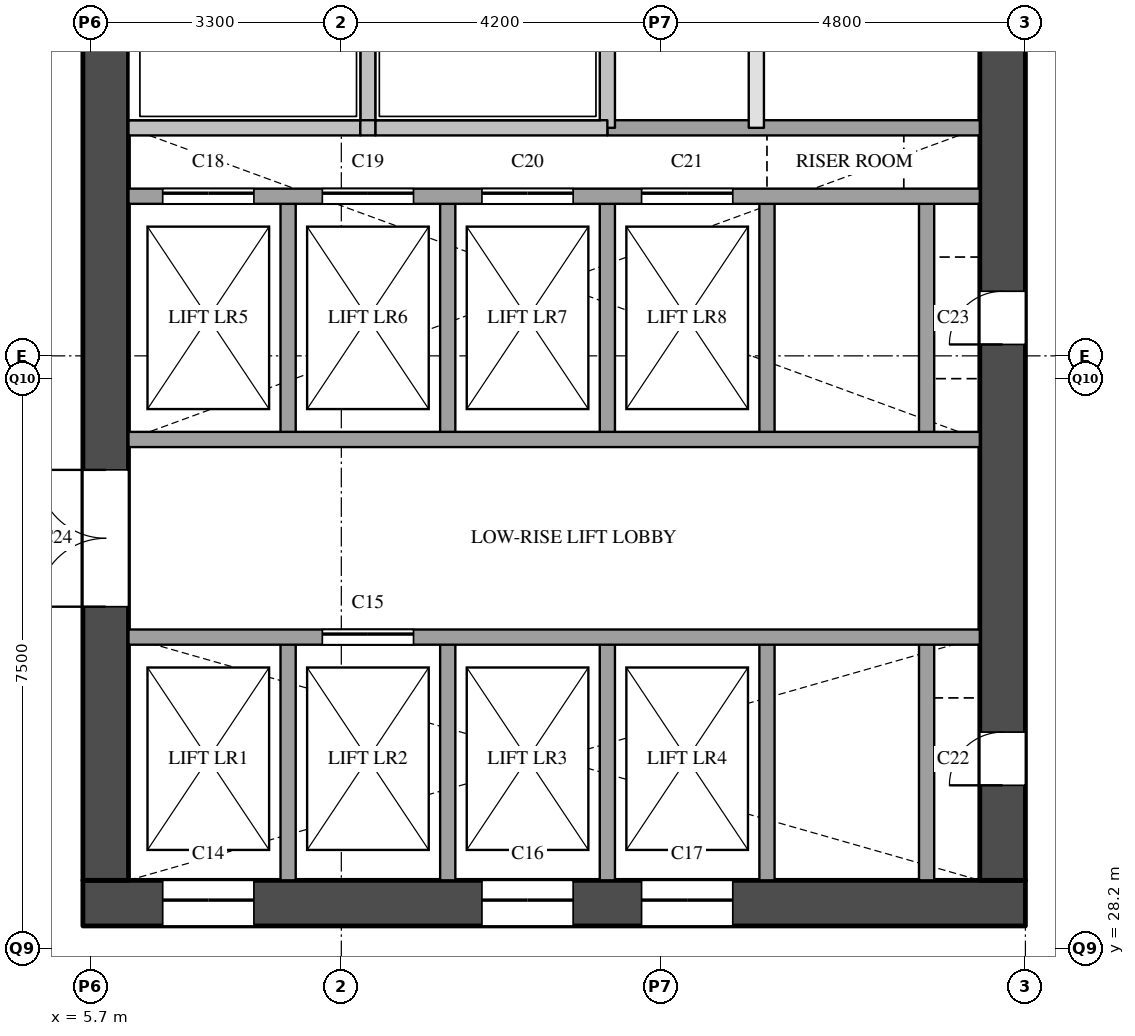
"""IFC4 building model, lengths in metres.
Left out: names, types, materials, properties, quantities, classifications, styles, units other than length and angle.
Written with IfcOpenShell. Run it as: python <this file> out.ifc"""

import sys

from ifc_helpers import new_model, si_unit, direction, frame, frame_2d, origin, place, context, subcontext, project, spatial, rectangle, extrude, element, fill, save


model = new_model("IFC4")
c1 = context("Model", 3, precision=1e-05, world=origin(), true_north=direction((0.0, 1.0)))
c2 = subcontext(c1, "Body", "Model", "MODEL_VIEW")
j1 = project(units=[si_unit("LENGTHUNIT", "METRE"), si_unit("PLANEANGLEUNIT", "RADIAN")], contexts=[c1])
p1 = place(None, origin())
s1 = spatial("IfcSite", under=j1, at=p1, CompositionType="ELEMENT")
p2 = place(p1, origin())
s2 = spatial("IfcBuilding", under=s1, at=p2, CompositionType="ELEMENT")
p3 = place(p2, frame((0.0, 0.0, 65.2)))
s3 = spatial("IfcBuildingStorey", under=s2, at=p3, CompositionType="ELEMENT", Elevation=65.2)
p4 = place(p3, frame((5.6, 28.8, 0.0), z_axis=(0.0, 0.0, 1.0), x_axis=(1.0, 0.0, 0.0)))
e1 = element("IfcWall", 1, at=p4, inside=s3, PredefinedType="SHEAR", context=c2, shape_type="SweptSolid", body=[
    extrude(rectangle(XDim=12.4, YDim=0.6, at=frame_2d((6.2, 0.0))), origin(), (0.0, 0.0, 1.0), 3.5),
])
p5 = place(p4, frame((1.05, 0.0, 0.0)))
e2 = element("IfcOpeningElement", 2, at=p5, cuts=e1, PredefinedType="OPENING", context=c2, shape_type="SweptSolid", body=[
    extrude(rectangle(XDim=1.2, YDim=2.1, at=frame_2d((0.6, 1.05))), frame((0.0, 0.31, 0.0), z_axis=(0.0, -1.0, 0.0), x_axis=(1.0, 0.0, 0.0)), (0.0, 0.0, 1.0), 0.62),
])
p6 = place(p4, frame((5.25, 0.0, 0.0)))
e3 = element("IfcOpeningElement", 3, at=p6, cuts=e1, PredefinedType="OPENING", context=c2, shape_type="SweptSolid", body=[
    extrude(rectangle(XDim=1.2, YDim=2.1, at=frame_2d((0.6, 1.05))), frame((0.0, 0.31, 0.0), z_axis=(0.0, -1.0, 0.0), x_axis=(1.0, 0.0, 0.0)), (0.0, 0.0, 1.0), 0.62),
])
p7 = place(p4, frame((7.35, 0.0, 0.0)))
e4 = element("IfcOpeningElement", 4, at=p7, cuts=e1, PredefinedType="OPENING", context=c2, shape_type="SweptSolid", body=[
    extrude(rectangle(XDim=1.2, YDim=2.1, at=frame_2d((0.6, 1.05))), frame((0.0, 0.31, 0.0), z_axis=(0.0, -1.0, 0.0), x_axis=(1.0, 0.0, 0.0)), (0.0, 0.0, 1.0), 0.62),
])
p8 = place(p3, frame((5.9, 29.1, 0.0), z_axis=(0.0, 0.0, 1.0), x_axis=(0.0, 1.0, 0.0)))
e5 = element("IfcWall", 5, at=p8, inside=s3, PredefinedType="SHEAR", context=c2, shape_type="SweptSolid", body=[
    extrude(rectangle(XDim=20.3, YDim=0.6, at=frame_2d((10.15, 0.0))), origin(), (0.0, 0.0, 1.0), 3.5),
])
p9 = place(p8, frame((3.6, 0.0, 0.0)))
e6 = element("IfcOpeningElement", 6, at=p9, cuts=e5, PredefinedType="OPENING", context=c2, shape_type="SweptSolid", body=[
    extrude(rectangle(XDim=1.8, YDim=2.1, at=frame_2d((0.9, 1.05))), frame((0.0, 0.31, 0.0), z_axis=(0.0, -1.0, 0.0), x_axis=(1.0, 0.0, 0.0)), (0.0, 0.0, 1.0), 0.62),
])
p10 = place(p8, frame((16.4, 0.0, 0.0)))
e7 = element("IfcOpeningElement", 7, at=p10, cuts=e5, PredefinedType="OPENING", context=c2, shape_type="SweptSolid", body=[
    extrude(rectangle(XDim=1.0, YDim=2.1, at=frame_2d((0.5, 1.05))), frame((0.0, 0.31, 0.0), z_axis=(0.0, -1.0, 0.0), x_axis=(1.0, 0.0, 0.0)), (0.0, 0.0, 1.0), 0.62),
])
p11 = place(p3, frame((17.7, 29.1, 0.0), z_axis=(0.0, 0.0, 1.0), x_axis=(0.0, 1.0, 0.0)))
e8 = element("IfcWall", 8, at=p11, inside=s3, PredefinedType="SHEAR", context=c2, shape_type="SweptSolid", body=[
    extrude(rectangle(XDim=20.3, YDim=0.6, at=frame_2d((10.15, 0.0))), origin(), (0.0, 0.0, 1.0), 3.5),
])
p12 = place(p11, frame((1.25, 0.0, 0.0)))
e9 = element("IfcOpeningElement", 9, at=p12, cuts=e8, PredefinedType="OPENING", context=c2, shape_type="SweptSolid", body=[
    extrude(rectangle(XDim=0.7, YDim=2.1, at=frame_2d((0.35, 1.05))), frame((0.0, 0.31, 0.0), z_axis=(0.0, -1.0, 0.0), x_axis=(1.0, 0.0, 0.0)), (0.0, 0.0, 1.0), 0.62),
])
p13 = place(p11, frame((7.05, 0.0, 0.0)))
e10 = element("IfcOpeningElement", 10, at=p13, cuts=e8, PredefinedType="OPENING", context=c2, shape_type="SweptSolid", body=[
    extrude(rectangle(XDim=0.7, YDim=2.1, at=frame_2d((0.35, 1.05))), frame((0.0, 0.31, 0.0), z_axis=(0.0, -1.0, 0.0), x_axis=(1.0, 0.0, 0.0)), (0.0, 0.0, 1.0), 0.62),
])
p14 = place(p3, frame((8.3, 29.1, 0.0), z_axis=(0.0, 0.0, 1.0), x_axis=(0.0, 1.0, 0.0)))
e11 = element("IfcWall", 11, at=p14, inside=s3, PredefinedType="SOLIDWALL", context=c2, shape_type="SweptSolid", body=[
    extrude(rectangle(XDim=3.2, YDim=0.2, at=frame_2d((1.6, 0.0))), origin(), (0.0, 0.0, 1.0), 3.5),
])
p15 = place(p3, frame((8.3, 34.9, 0.0), z_axis=(0.0, 0.0, 1.0), x_axis=(0.0, 1.0, 0.0)))
e12 = element("IfcWall", 12, at=p15, inside=s3, PredefinedType="SOLIDWALL", context=c2, shape_type="SweptSolid", body=[
    extrude(rectangle(XDim=3.2, YDim=0.2, at=frame_2d((1.6, 0.0))), origin(), (0.0, 0.0, 1.0), 3.5),
])
p16 = place(p3, frame((9.35, 39.0, 0.0), z_axis=(0.0, 0.0, 1.0), x_axis=(0.0, 1.0, 0.0)))
e13 = element("IfcWall", 13, at=p16, inside=s3, PredefinedType="SOLIDWALL", context=c2, shape_type="SweptSolid", body=[
    extrude(rectangle(XDim=1.9, YDim=0.2, at=frame_2d((0.95, 0.0))), origin(), (0.0, 0.0, 1.0), 3.5),
])
p17 = place(p3, frame((10.4, 29.1, 0.0), z_axis=(0.0, 0.0, 1.0), x_axis=(0.0, 1.0, 0.0)))
e14 = element("IfcWall", 14, at=p17, inside=s3, PredefinedType="SOLIDWALL", context=c2, shape_type="SweptSolid", body=[
    extrude(rectangle(XDim=3.2, YDim=0.2, at=frame_2d((1.6, 0.0))), origin(), (0.0, 0.0, 1.0), 3.5),
])
p18 = place(p3, frame((10.4, 34.9, 0.0), z_axis=(0.0, 0.0, 1.0), x_axis=(0.0, 1.0, 0.0)))
e15 = element("IfcWall", 15, at=p18, inside=s3, PredefinedType="SOLIDWALL", context=c2, shape_type="SweptSolid", body=[
    extrude(rectangle(XDim=3.2, YDim=0.2, at=frame_2d((1.6, 0.0))), origin(), (0.0, 0.0, 1.0), 3.5),
])
p19 = place(p3, frame((12.5, 29.1, 0.0), z_axis=(0.0, 0.0, 1.0), x_axis=(0.0, 1.0, 0.0)))
e16 = element("IfcWall", 16, at=p19, inside=s3, PredefinedType="SOLIDWALL", context=c2, shape_type="SweptSolid", body=[
    extrude(rectangle(XDim=3.2, YDim=0.2, at=frame_2d((1.6, 0.0))), origin(), (0.0, 0.0, 1.0), 3.5),
])
p20 = place(p3, frame((12.5, 34.9, 0.0), z_axis=(0.0, 0.0, 1.0), x_axis=(0.0, 1.0, 0.0)))
e17 = element("IfcWall", 17, at=p20, inside=s3, PredefinedType="SOLIDWALL", context=c2, shape_type="SweptSolid", body=[
    extrude(rectangle(XDim=3.2, YDim=0.2, at=frame_2d((1.6, 0.0))), origin(), (0.0, 0.0, 1.0), 3.5),
])
p21 = place(p3, frame((12.5, 39.0, 0.0), z_axis=(0.0, 0.0, 1.0), x_axis=(0.0, 1.0, 0.0)))
e18 = element("IfcWall", 18, at=p21, inside=s3, PredefinedType="SOLIDWALL", context=c2, shape_type="SweptSolid", body=[
    extrude(rectangle(XDim=1.9, YDim=0.2, at=frame_2d((0.95, 0.0))), origin(), (0.0, 0.0, 1.0), 3.5),
])
p22 = place(p3, frame((14.46, 39.0, 0.0), z_axis=(0.0, 0.0, 1.0), x_axis=(0.0, 1.0, 0.0)))
e19 = element("IfcWall", 19, at=p22, inside=s3, PredefinedType="PARTITIONING", context=c2, shape_type="SweptSolid", body=[
    extrude(rectangle(XDim=6.2, YDim=0.2, at=frame_2d((3.1, 0.0))), origin(), (0.0, 0.0, 1.0), 3.5),
])
p23 = place(p3, frame((14.6, 29.1, 0.0), z_axis=(0.0, 0.0, 1.0), x_axis=(0.0, 1.0, 0.0)))
e20 = element("IfcWall", 20, at=p23, inside=s3, PredefinedType="SOLIDWALL", context=c2, shape_type="SweptSolid", body=[
    extrude(rectangle(XDim=3.2, YDim=0.2, at=frame_2d((1.6, 0.0))), origin(), (0.0, 0.0, 1.0), 3.5),
])
p24 = place(p3, frame((14.6, 34.9, 0.0), z_axis=(0.0, 0.0, 1.0), x_axis=(0.0, 1.0, 0.0)))
e21 = element("IfcWall", 21, at=p24, inside=s3, PredefinedType="SOLIDWALL", context=c2, shape_type="SweptSolid", body=[
    extrude(rectangle(XDim=3.2, YDim=0.2, at=frame_2d((1.6, 0.0))), origin(), (0.0, 0.0, 1.0), 3.5),
])
p25 = place(p3, frame((16.7, 29.1, 0.0), z_axis=(0.0, 0.0, 1.0), x_axis=(0.0, 1.0, 0.0)))
e22 = element("IfcWall", 22, at=p25, inside=s3, PredefinedType="SOLIDWALL", context=c2, shape_type="SweptSolid", body=[
    extrude(rectangle(XDim=3.2, YDim=0.2, at=frame_2d((1.6, 0.0))), origin(), (0.0, 0.0, 1.0), 3.5),
])
p26 = place(p3, frame((16.7, 34.9, 0.0), z_axis=(0.0, 0.0, 1.0), x_axis=(0.0, 1.0, 0.0)))
e23 = element("IfcWall", 23, at=p26, inside=s3, PredefinedType="SOLIDWALL", context=c2, shape_type="SweptSolid", body=[
    extrude(rectangle(XDim=3.2, YDim=0.2, at=frame_2d((1.6, 0.0))), origin(), (0.0, 0.0, 1.0), 3.5),
])
p27 = place(p3, frame((6.2, 32.3, 0.0), z_axis=(0.0, 0.0, 1.0), x_axis=(1.0, 0.0, 0.0)))
e24 = element("IfcWall", 24, at=p27, inside=s3, PredefinedType="SOLIDWALL", context=c2, shape_type="SweptSolid", body=[
    extrude(rectangle(XDim=11.2, YDim=0.2, at=frame_2d((5.6, 0.0))), origin(), (0.0, 0.0, 1.0), 3.5),
])
p28 = place(p27, frame((2.55, 0.0, 0.0)))
e25 = element("IfcOpeningElement", 25, at=p28, cuts=e24, PredefinedType="OPENING", context=c2, shape_type="SweptSolid", body=[
    extrude(rectangle(XDim=1.2, YDim=2.1, at=frame_2d((0.6, 1.05))), frame((0.0, 0.11, 0.0), z_axis=(0.0, -1.0, 0.0), x_axis=(1.0, 0.0, 0.0)), (0.0, 0.0, 1.0), 0.22),
])
p29 = place(p3, frame((6.2, 34.9, 0.0), z_axis=(0.0, 0.0, 1.0), x_axis=(1.0, 0.0, 0.0)))
e26 = element("IfcWall", 26, at=p29, inside=s3, PredefinedType="SOLIDWALL", context=c2, shape_type="SweptSolid", body=[
    extrude(rectangle(XDim=11.2, YDim=0.2, at=frame_2d((5.6, 0.0))), origin(), (0.0, 0.0, 1.0), 3.5),
])
p30 = place(p3, frame((6.2, 38.1, 0.0), z_axis=(0.0, 0.0, 1.0), x_axis=(1.0, 0.0, 0.0)))
e27 = element("IfcWall", 27, at=p30, inside=s3, PredefinedType="SOLIDWALL", context=c2, shape_type="SweptSolid", body=[
    extrude(rectangle(XDim=11.2, YDim=0.2, at=frame_2d((5.6, 0.0))), origin(), (0.0, 0.0, 1.0), 3.5),
])
p31 = place(p30, frame((0.45, 0.0, 0.0)))
e28 = element("IfcOpeningElement", 28, at=p31, cuts=e27, PredefinedType="OPENING", context=c2, shape_type="SweptSolid", body=[
    extrude(rectangle(XDim=1.2, YDim=2.1, at=frame_2d((0.6, 1.05))), frame((0.0, 0.11, 0.0), z_axis=(0.0, -1.0, 0.0), x_axis=(1.0, 0.0, 0.0)), (0.0, 0.0, 1.0), 0.22),
])
p32 = place(p30, frame((2.55, 0.0, 0.0)))
e29 = element("IfcOpeningElement", 29, at=p32, cuts=e27, PredefinedType="OPENING", context=c2, shape_type="SweptSolid", body=[
    extrude(rectangle(XDim=1.2, YDim=2.1, at=frame_2d((0.6, 1.05))), frame((0.0, 0.11, 0.0), z_axis=(0.0, -1.0, 0.0), x_axis=(1.0, 0.0, 0.0)), (0.0, 0.0, 1.0), 0.22),
])
p33 = place(p30, frame((4.65, 0.0, 0.0)))
e30 = element("IfcOpeningElement", 30, at=p33, cuts=e27, PredefinedType="OPENING", context=c2, shape_type="SweptSolid", body=[
    extrude(rectangle(XDim=1.2, YDim=2.1, at=frame_2d((0.6, 1.05))), frame((0.0, 0.11, 0.0), z_axis=(0.0, -1.0, 0.0), x_axis=(1.0, 0.0, 0.0)), (0.0, 0.0, 1.0), 0.22),
])
p34 = place(p30, frame((6.75, 0.0, 0.0)))
e31 = element("IfcOpeningElement", 31, at=p34, cuts=e27, PredefinedType="OPENING", context=c2, shape_type="SweptSolid", body=[
    extrude(rectangle(XDim=1.2, YDim=2.1, at=frame_2d((0.6, 1.05))), frame((0.0, 0.11, 0.0), z_axis=(0.0, -1.0, 0.0), x_axis=(1.0, 0.0, 0.0)), (0.0, 0.0, 1.0), 0.22),
])
p35 = place(p3, frame((12.5, 39.0, 0.0), z_axis=(0.0, 0.0, 1.0), x_axis=(1.0, 0.0, 0.0)))
e32 = element("IfcWall", 32, at=p35, inside=s3, PredefinedType="SOLIDWALL", context=c2, shape_type="SweptSolid", body=[
    extrude(rectangle(XDim=4.9, YDim=0.2, at=frame_2d((2.45, 0.0))), origin(), (0.0, 0.0, 1.0), 3.5),
])
p36 = place(p3, frame((6.2, 39.0, 0.0), z_axis=(0.0, 0.0, 1.0), x_axis=(1.0, 0.0, 0.0)))
e33 = element("IfcWall", 33, at=p36, inside=s3, PredefinedType="SOLIDWALL", context=c2, shape_type="SweptSolid", body=[
    extrude(rectangle(XDim=3.05, YDim=0.2, at=frame_2d((1.525, 0.0))), origin(), (0.0, 0.0, 1.0), 3.5),
])
p37 = place(p3, frame((9.25, 39.0, 0.0), z_axis=(0.0, 0.0, 1.0), x_axis=(1.0, 0.0, 0.0)))
e34 = element("IfcWall", 34, at=p37, inside=s3, PredefinedType="SOLIDWALL", context=c2, shape_type="SweptSolid", body=[
    extrude(rectangle(XDim=0.2, YDim=0.2, at=frame_2d((0.1, 0.0))), origin(), (0.0, 0.0, 1.0), 3.5),
])
p38 = place(p3, frame((9.45, 39.0, 0.0), z_axis=(0.0, 0.0, 1.0), x_axis=(1.0, 0.0, 0.0)))
e35 = element("IfcWall", 35, at=p38, inside=s3, PredefinedType="SOLIDWALL", context=c2, shape_type="SweptSolid", body=[
    extrude(rectangle(XDim=3.05, YDim=0.2, at=frame_2d((1.525, 0.0))), origin(), (0.0, 0.0, 1.0), 3.5),
])
p39 = place(p5, origin())
e36 = element("IfcDoor", 36, at=p39, inside=s3, OperationType="SLIDING_TO_LEFT", PredefinedType="DOOR", context=c2, shape_type="SweptSolid", body=[
    extrude(rectangle(XDim=1.2, YDim=2.1, at=frame_2d((0.6, 1.05))), frame((0.0, 0.025, 0.0), z_axis=(0.0, -1.0, 0.0), x_axis=(1.0, 0.0, 0.0)), (0.0, 0.0, 1.0), 0.05),
])
fill(e2, e36)
p40 = place(p28, origin())
e37 = element("IfcDoor", 37, at=p40, inside=s3, OperationType="SLIDING_TO_LEFT", PredefinedType="DOOR", context=c2, shape_type="SweptSolid", body=[
    extrude(rectangle(XDim=1.2, YDim=2.1, at=frame_2d((0.6, 1.05))), frame((0.0, 0.025, 0.0), z_axis=(0.0, -1.0, 0.0), x_axis=(1.0, 0.0, 0.0)), (0.0, 0.0, 1.0), 0.05),
])
fill(e25, e37)
p41 = place(p6, origin())
e38 = element("IfcDoor", 38, at=p41, inside=s3, OperationType="SLIDING_TO_LEFT", PredefinedType="DOOR", context=c2, shape_type="SweptSolid", body=[
    extrude(rectangle(XDim=1.2, YDim=2.1, at=frame_2d((0.6, 1.05))), frame((0.0, 0.025, 0.0), z_axis=(0.0, -1.0, 0.0), x_axis=(1.0, 0.0, 0.0)), (0.0, 0.0, 1.0), 0.05),
])
fill(e3, e38)
p42 = place(p7, origin())
e39 = element("IfcDoor", 39, at=p42, inside=s3, OperationType="SLIDING_TO_LEFT", PredefinedType="DOOR", context=c2, shape_type="SweptSolid", body=[
    extrude(rectangle(XDim=1.2, YDim=2.1, at=frame_2d((0.6, 1.05))), frame((0.0, 0.025, 0.0), z_axis=(0.0, -1.0, 0.0), x_axis=(1.0, 0.0, 0.0)), (0.0, 0.0, 1.0), 0.05),
])
fill(e4, e39)
p43 = place(p31, origin())
e40 = element("IfcDoor", 40, at=p43, inside=s3, OperationType="SLIDING_TO_LEFT", PredefinedType="DOOR", context=c2, shape_type="SweptSolid", body=[
    extrude(rectangle(XDim=1.2, YDim=2.1, at=frame_2d((0.6, 1.05))), frame((0.0, 0.025, 0.0), z_axis=(0.0, -1.0, 0.0), x_axis=(1.0, 0.0, 0.0)), (0.0, 0.0, 1.0), 0.05),
])
fill(e28, e40)
p44 = place(p32, origin())
e41 = element("IfcDoor", 41, at=p44, inside=s3, OperationType="SLIDING_TO_LEFT", PredefinedType="DOOR", context=c2, shape_type="SweptSolid", body=[
    extrude(rectangle(XDim=1.2, YDim=2.1, at=frame_2d((0.6, 1.05))), frame((0.0, 0.025, 0.0), z_axis=(0.0, -1.0, 0.0), x_axis=(1.0, 0.0, 0.0)), (0.0, 0.0, 1.0), 0.05),
])
fill(e29, e41)
p45 = place(p33, origin())
e42 = element("IfcDoor", 42, at=p45, inside=s3, OperationType="SLIDING_TO_LEFT", PredefinedType="DOOR", context=c2, shape_type="SweptSolid", body=[
    extrude(rectangle(XDim=1.2, YDim=2.1, at=frame_2d((0.6, 1.05))), frame((0.0, 0.025, 0.0), z_axis=(0.0, -1.0, 0.0), x_axis=(1.0, 0.0, 0.0)), (0.0, 0.0, 1.0), 0.05),
])
fill(e30, e42)
p46 = place(p34, origin())
e43 = element("IfcDoor", 43, at=p46, inside=s3, OperationType="SLIDING_TO_LEFT", PredefinedType="DOOR", context=c2, shape_type="SweptSolid", body=[
    extrude(rectangle(XDim=1.2, YDim=2.1, at=frame_2d((0.6, 1.05))), frame((0.0, 0.025, 0.0), z_axis=(0.0, -1.0, 0.0), x_axis=(1.0, 0.0, 0.0)), (0.0, 0.0, 1.0), 0.05),
])
fill(e31, e43)
p47 = place(p12, origin())
e44 = element("IfcDoor", 44, at=p47, inside=s3, OperationType="SINGLE_SWING_LEFT", PredefinedType="DOOR", context=c2, shape_type="SweptSolid", body=[
    extrude(rectangle(XDim=0.7, YDim=2.1, at=frame_2d((0.35, 1.05))), frame((0.0, 0.025, 0.0), z_axis=(0.0, -1.0, 0.0), x_axis=(1.0, 0.0, 0.0)), (0.0, 0.0, 1.0), 0.05),
])
fill(e9, e44)
p48 = place(p13, origin())
e45 = element("IfcDoor", 45, at=p48, inside=s3, OperationType="SINGLE_SWING_LEFT", PredefinedType="DOOR", context=c2, shape_type="SweptSolid", body=[
    extrude(rectangle(XDim=0.7, YDim=2.1, at=frame_2d((0.35, 1.05))), frame((0.0, 0.025, 0.0), z_axis=(0.0, -1.0, 0.0), x_axis=(1.0, 0.0, 0.0)), (0.0, 0.0, 1.0), 0.05),
])
fill(e10, e45)
p49 = place(p9, origin())
e46 = element("IfcDoor", 46, at=p49, inside=s3, OperationType="DOUBLE_DOOR_SINGLE_SWING", PredefinedType="DOOR", context=c2, shape_type="SweptSolid", body=[
    extrude(rectangle(XDim=1.8, YDim=2.1, at=frame_2d((0.9, 1.05))), frame((0.0, 0.025, 0.0), z_axis=(0.0, -1.0, 0.0), x_axis=(1.0, 0.0, 0.0)), (0.0, 0.0, 1.0), 0.05),
])
fill(e6, e46)
save(model, sys.argv[1])
